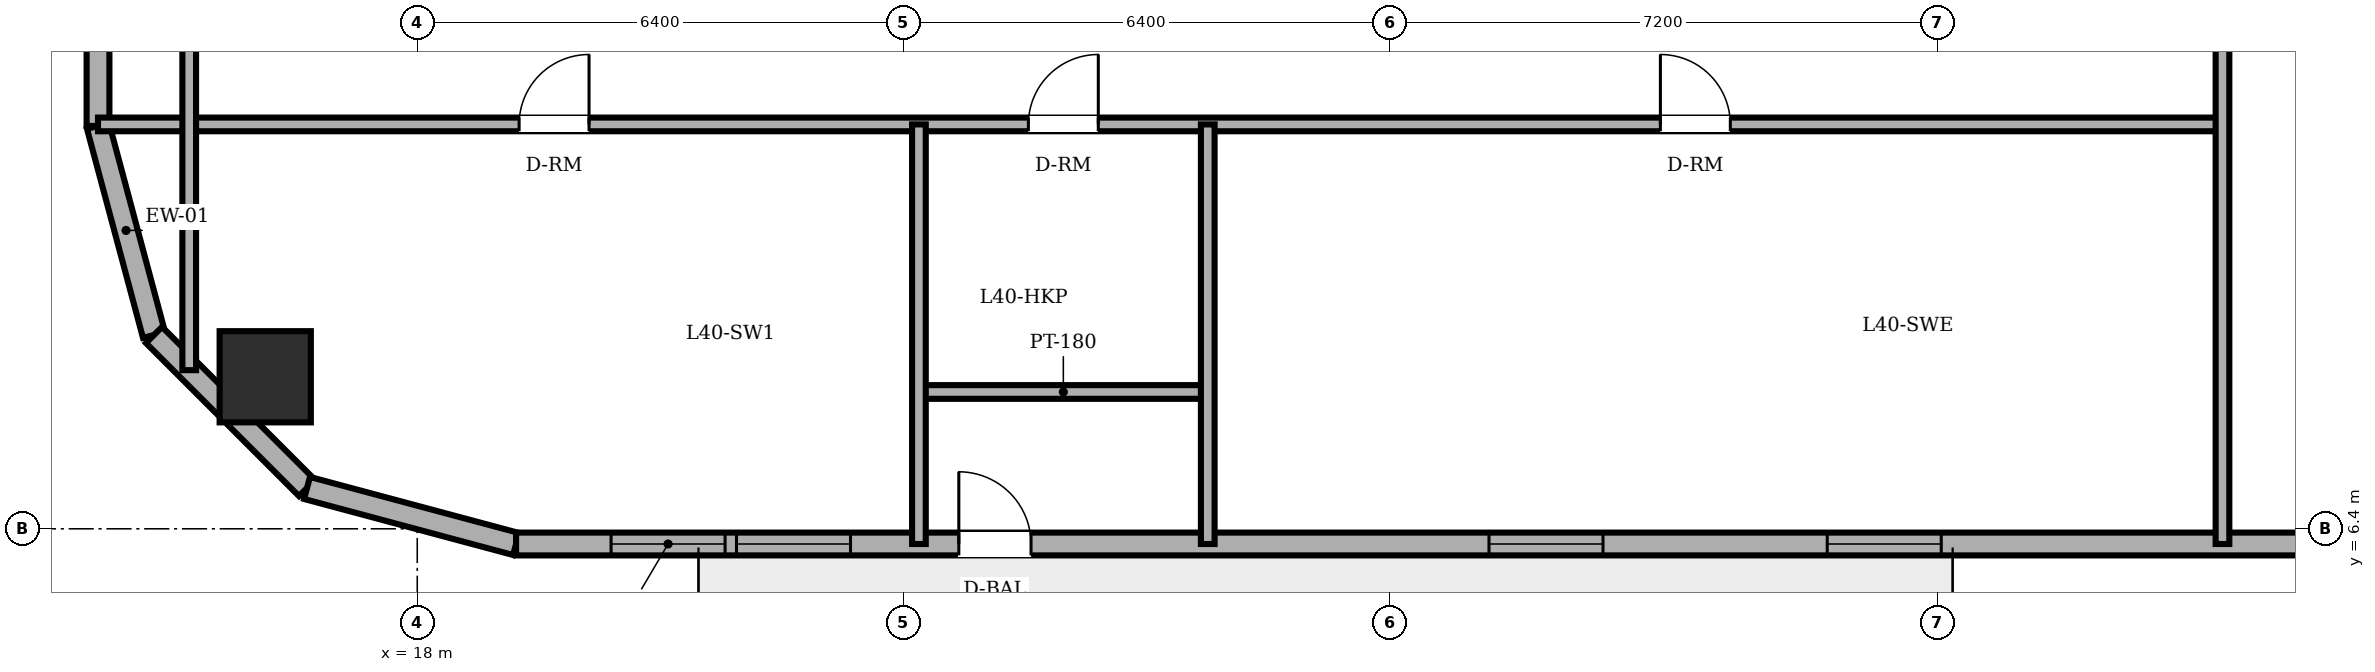
"""IFC4 building model, lengths in metres.
Left out: names, types, materials, properties, quantities, classifications, styles, units other than length and angle.
Written with IfcOpenShell. Run it as: python <this file> out.ifc"""

import sys

from ifc_helpers import new_model, si_unit, direction, frame, frame_2d, origin, origin_2d, place, context, subcontext, project, spatial, rectangle, circle, extrude, element, fill, save


model = new_model("IFC4")
c1 = context("Model", 3, precision=1e-05, world=origin(), true_north=direction((0.0, 1.0)))
c2 = subcontext(c1, "Body", "Model", "MODEL_VIEW")
j1 = project(units=[si_unit("LENGTHUNIT", "METRE"), si_unit("PLANEANGLEUNIT", "RADIAN")], contexts=[c1])
p1 = place(None, origin())
s1 = spatial("IfcSite", under=j1, at=p1, CompositionType="ELEMENT")
p2 = place(p1, origin())
s2 = spatial("IfcBuilding", under=s1, at=p2, CompositionType="ELEMENT")
p3 = place(p2, frame((0.0, 0.0, 154.6)))
s3 = spatial("IfcBuildingStorey", under=s2, at=p3, CompositionType="ELEMENT", Elevation=154.6)
p4 = place(p3, frame((16.0, 8.4, 0.0), z_axis=(0.0, 0.0, 1.0), x_axis=(1.0, 0.0, 0.0)))
e1 = element("IfcColumn", 1, at=p4, inside=s3, PredefinedType="COLUMN", context=c2, shape_type="SweptSolid", body=[
    extrude(circle(Radius=0.6, at=origin_2d()), origin(), (0.0, 0.0, 1.0), 3.6),
])
p5 = place(p3, frame((13.8, 11.7, 0.0), z_axis=(0.0, 0.0, 1.0), x_axis=(0.258884674387, -0.965908238586, 0.0)))
e2 = element("IfcWall", 2, at=p5, inside=s3, PredefinedType="SOLIDWALL", context=c2, shape_type="SweptSolid", body=[
    extrude(rectangle(XDim=2.847, YDim=0.3, at=frame_2d((1.424, 0.0))), origin(), (0.0, 0.0, 1.0), 3.4),
])
p6 = place(p3, frame((14.537, 8.95, 0.0), z_axis=(0.0, 0.0, 1.0), x_axis=(0.707106781187, -0.707106781187, 0.0)))
e3 = element("IfcWall", 3, at=p6, inside=s3, PredefinedType="SOLIDWALL", context=c2, shape_type="SweptSolid", body=[
    extrude(rectangle(XDim=2.847, YDim=0.3, at=frame_2d((1.423, 0.0))), origin(), (0.0, 0.0, 1.0), 3.4),
])
p7 = place(p3, frame((16.55, 6.937, 0.0), z_axis=(0.0, 0.0, 1.0), x_axis=(0.965908238586, -0.258884674387, 0.0)))
e4 = element("IfcWall", 4, at=p7, inside=s3, PredefinedType="SOLIDWALL", context=c2, shape_type="SweptSolid", body=[
    extrude(rectangle(XDim=2.847, YDim=0.3, at=frame_2d((1.424, 0.0))), origin(), (0.0, 0.0, 1.0), 3.4),
])
p8 = place(p3, frame((19.3, 6.2, 0.0), z_axis=(0.0, 0.0, 1.0), x_axis=(1.0, 0.0, 0.0)))
e5 = element("IfcWall", 5, at=p8, inside=s3, PredefinedType="SOLIDWALL", context=c2, shape_type="SweptSolid", body=[
    extrude(rectangle(XDim=30.282, YDim=0.3, at=frame_2d((15.141, 0.0))), origin(), (0.0, 0.0, 1.0), 3.4),
])
p9 = place(p8, frame((5.825, 0.0, 0.0)))
e6 = element("IfcOpeningElement", 6, at=p9, cuts=e5, PredefinedType="OPENING", context=c2, shape_type="SweptSolid", body=[
    extrude(rectangle(XDim=0.95, YDim=2.2, at=frame_2d((0.475, 1.1))), frame((0.0, 0.16, 0.0), z_axis=(0.0, -1.0, 0.0), x_axis=(1.0, 0.0, 0.0)), (0.0, 0.0, 1.0), 0.32),
])
p10 = place(p8, frame((1.25, 0.0, 0.85)))
e7 = element("IfcOpeningElement", 7, at=p10, cuts=e5, PredefinedType="OPENING", context=c2, shape_type="SweptSolid", body=[
    extrude(rectangle(XDim=1.5, YDim=1.55, at=frame_2d((0.75, 0.775))), frame((0.0, 0.16, 0.0), z_axis=(0.0, -1.0, 0.0), x_axis=(1.0, 0.0, 0.0)), (0.0, 0.0, 1.0), 0.32),
])
p11 = place(p8, frame((2.9, 0.0, 0.85)))
e8 = element("IfcOpeningElement", 8, at=p11, cuts=e5, PredefinedType="OPENING", context=c2, shape_type="SweptSolid", body=[
    extrude(rectangle(XDim=1.5, YDim=1.55, at=frame_2d((0.75, 0.775))), frame((0.0, 0.16, 0.0), z_axis=(0.0, -1.0, 0.0), x_axis=(1.0, 0.0, 0.0)), (0.0, 0.0, 1.0), 0.32),
])
p12 = place(p8, frame((12.8, 0.0, 0.85)))
e9 = element("IfcOpeningElement", 9, at=p12, cuts=e5, PredefinedType="OPENING", context=c2, shape_type="SweptSolid", body=[
    extrude(rectangle(XDim=1.5, YDim=1.55, at=frame_2d((0.75, 0.775))), frame((0.0, 0.16, 0.0), z_axis=(0.0, -1.0, 0.0), x_axis=(1.0, 0.0, 0.0)), (0.0, 0.0, 1.0), 0.32),
])
p13 = place(p8, frame((17.25, 0.0, 0.85)))
e10 = element("IfcOpeningElement", 10, at=p13, cuts=e5, PredefinedType="OPENING", context=c2, shape_type="SweptSolid", body=[
    extrude(rectangle(XDim=1.5, YDim=1.55, at=frame_2d((0.75, 0.775))), frame((0.0, 0.16, 0.0), z_axis=(0.0, -1.0, 0.0), x_axis=(1.0, 0.0, 0.0)), (0.0, 0.0, 1.0), 0.32),
])
p14 = place(p8, frame((24.194, 0.0, 0.85)))
e11 = element("IfcOpeningElement", 11, at=p14, cuts=e5, PredefinedType="OPENING", context=c2, shape_type="SweptSolid", body=[
    extrude(rectangle(XDim=1.5, YDim=1.55, at=frame_2d((0.75, 0.775))), frame((0.0, 0.16, 0.0), z_axis=(0.0, -1.0, 0.0), x_axis=(1.0, 0.0, 0.0)), (0.0, 0.0, 1.0), 0.32),
])
p15 = place(p8, frame((26.688, 0.0, 0.85)))
e12 = element("IfcOpeningElement", 12, at=p15, cuts=e5, PredefinedType="OPENING", context=c2, shape_type="SweptSolid", body=[
    extrude(rectangle(XDim=1.5, YDim=1.55, at=frame_2d((0.75, 0.775))), frame((0.0, 0.16, 0.0), z_axis=(0.0, -1.0, 0.0), x_axis=(1.0, 0.0, 0.0)), (0.0, 0.0, 1.0), 0.32),
])
p16 = place(p3, frame((13.8, 36.3, 0.0), z_axis=(0.0, 0.0, 1.0), x_axis=(0.0, -1.0, 0.0)))
e13 = element("IfcWall", 13, at=p16, inside=s3, PredefinedType="SOLIDWALL", context=c2, shape_type="SweptSolid", body=[
    extrude(rectangle(XDim=24.6, YDim=0.3, at=frame_2d((12.3, 0.0))), origin(), (0.0, 0.0, 1.0), 3.4),
])
p17 = place(p16, frame((8.277, 0.0, 0.85)))
e14 = element("IfcOpeningElement", 14, at=p17, cuts=e13, PredefinedType="OPENING", context=c2, shape_type="SweptSolid", body=[
    extrude(rectangle(XDim=1.5, YDim=1.55, at=frame_2d((0.75, 0.775))), frame((0.0, 0.16, 0.0), z_axis=(0.0, -1.0, 0.0), x_axis=(1.0, 0.0, 0.0)), (0.0, 0.0, 1.0), 0.32),
])
p18 = place(p16, frame((14.823, 0.0, 0.85)))
e15 = element("IfcOpeningElement", 15, at=p18, cuts=e13, PredefinedType="OPENING", context=c2, shape_type="SweptSolid", body=[
    extrude(rectangle(XDim=1.5, YDim=1.55, at=frame_2d((0.75, 0.775))), frame((0.0, 0.16, 0.0), z_axis=(0.0, -1.0, 0.0), x_axis=(1.0, 0.0, 0.0)), (0.0, 0.0, 1.0), 0.32),
])
p19 = place(p3, frame((24.6, 8.2, 0.0), z_axis=(0.0, 0.0, 1.0), x_axis=(1.0, 0.0, 0.0)))
e16 = element("IfcWall", 16, at=p19, inside=s3, PredefinedType="PARTITIONING", context=c2, shape_type="SweptSolid", body=[
    extrude(rectangle(XDim=3.8, YDim=0.18, at=frame_2d((1.9, 0.0))), origin(), (0.0, 0.0, 1.0), 2.882),
])
p20 = place(p3, frame((13.8, 11.72, 0.0), z_axis=(0.0, 0.0, 1.0), x_axis=(1.0, 0.0, 0.0)))
e17 = element("IfcWall", 17, at=p20, inside=s3, PredefinedType="PARTITIONING", context=c2, shape_type="SweptSolid", body=[
    extrude(rectangle(XDim=27.95, YDim=0.18, at=frame_2d((13.975, 0.0))), origin(), (0.0, 0.0, 1.0), 3.4),
])
p21 = place(p20, frame((12.24, 0.0, 0.0)))
e18 = element("IfcOpeningElement", 18, at=p21, cuts=e17, PredefinedType="OPENING", context=c2, shape_type="SweptSolid", body=[
    extrude(rectangle(XDim=0.92, YDim=2.1, at=frame_2d((0.46, 1.05))), frame((0.0, 0.1, 0.0), z_axis=(0.0, -1.0, 0.0), x_axis=(1.0, 0.0, 0.0)), (0.0, 0.0, 1.0), 0.2),
])
p22 = place(p20, frame((5.54, 0.0, 0.0)))
e19 = element("IfcOpeningElement", 19, at=p22, cuts=e17, PredefinedType="OPENING", context=c2, shape_type="SweptSolid", body=[
    extrude(rectangle(XDim=0.92, YDim=2.1, at=frame_2d((0.46, 1.05))), frame((0.0, 0.1, 0.0), z_axis=(0.0, -1.0, 0.0), x_axis=(1.0, 0.0, 0.0)), (0.0, 0.0, 1.0), 0.2),
])
p23 = place(p20, frame((20.555, 0.0, 0.0)))
e20 = element("IfcOpeningElement", 20, at=p23, cuts=e17, PredefinedType="OPENING", context=c2, shape_type="SweptSolid", body=[
    extrude(rectangle(XDim=0.92, YDim=2.1, at=frame_2d((0.46, 1.05))), frame((0.0, 0.1, 0.0), z_axis=(0.0, -1.0, 0.0), x_axis=(1.0, 0.0, 0.0)), (0.0, 0.0, 1.0), 0.2),
])
p24 = place(p3, frame((15.0, 8.487, 0.0), z_axis=(0.0, 0.0, 1.0), x_axis=(0.0, 1.0, 0.0)))
e21 = element("IfcWall", 21, at=p24, inside=s3, PredefinedType="PARTITIONING", context=c2, shape_type="SweptSolid", body=[
    extrude(rectangle(XDim=5.693, YDim=0.18, at=frame_2d((2.846, 0.0))), origin(), (0.0, 0.0, 1.0), 3.4),
])
for number, where, z_axis, x_axis in (
    (22, (24.6, 6.2, 0.0), (0.0, 0.0, 1.0), (0.0, 1.0, 0.0)),
    (23, (28.4, 6.2, 0.0), (0.0, 0.0, 1.0), (0.0, 1.0, 0.0)),
):
    element("IfcWall", number, at=place(p3, frame(where, z_axis=z_axis, x_axis=x_axis)), inside=s3, PredefinedType="PARTITIONING", context=c2, shape_type="SweptSolid", body=[
        extrude(rectangle(XDim=5.52, YDim=0.18, at=frame_2d((2.76, 0.0))), origin(), (0.0, 0.0, 1.0), 3.4),
    ])
p25 = place(p3, frame((41.75, 6.2, 0.0), z_axis=(0.0, 0.0, 1.0), x_axis=(0.0, 1.0, 0.0)))
e24 = element("IfcWall", 24, at=p25, inside=s3, PredefinedType="PARTITIONING", context=c2, shape_type="SweptSolid", body=[
    extrude(rectangle(XDim=16.62, YDim=0.18, at=frame_2d((8.31, 0.0))), origin(), (0.0, 0.0, 1.0), 3.4),
])
p26 = place(p25, frame((10.35, 0.0, 0.0)))
e25 = element("IfcOpeningElement", 25, at=p26, cuts=e24, PredefinedType="OPENING", context=c2, shape_type="SweptSolid", body=[
    extrude(rectangle(XDim=0.92, YDim=2.1, at=frame_2d((0.46, 1.05))), frame((0.0, 0.1, 0.0), z_axis=(0.0, -1.0, 0.0), x_axis=(1.0, 0.0, 0.0)), (0.0, 0.0, 1.0), 0.2),
])
p27 = place(p9, origin())
e26 = element("IfcDoor", 26, at=p27, inside=s3, OperationType="SINGLE_SWING_LEFT", PredefinedType="DOOR", context=c2, shape_type="SweptSolid", body=[
    extrude(rectangle(XDim=0.95, YDim=2.2, at=frame_2d((0.475, 1.1))), frame((0.0, 0.025, 0.0), z_axis=(0.0, -1.0, 0.0), x_axis=(1.0, 0.0, 0.0)), (0.0, 0.0, 1.0), 0.05),
])
fill(e6, e26)
p28 = place(p10, origin())
e27 = element("IfcWindow", 27, at=p28, inside=s3, PartitioningType="DOUBLE_PANEL_VERTICAL", PredefinedType="WINDOW", context=c2, shape_type="SweptSolid", body=[
    extrude(rectangle(XDim=1.5, YDim=1.55, at=frame_2d((0.75, 0.775))), frame((0.0, 0.03, 0.0), z_axis=(0.0, -1.0, 0.0), x_axis=(1.0, 0.0, 0.0)), (0.0, 0.0, 1.0), 0.06),
])
fill(e7, e27)
p29 = place(p11, origin())
e28 = element("IfcWindow", 28, at=p29, inside=s3, PartitioningType="DOUBLE_PANEL_VERTICAL", PredefinedType="WINDOW", context=c2, shape_type="SweptSolid", body=[
    extrude(rectangle(XDim=1.5, YDim=1.55, at=frame_2d((0.75, 0.775))), frame((0.0, 0.03, 0.0), z_axis=(0.0, -1.0, 0.0), x_axis=(1.0, 0.0, 0.0)), (0.0, 0.0, 1.0), 0.06),
])
fill(e8, e28)
p30 = place(p12, origin())
e29 = element("IfcWindow", 29, at=p30, inside=s3, PartitioningType="DOUBLE_PANEL_VERTICAL", PredefinedType="WINDOW", context=c2, shape_type="SweptSolid", body=[
    extrude(rectangle(XDim=1.5, YDim=1.55, at=frame_2d((0.75, 0.775))), frame((0.0, 0.03, 0.0), z_axis=(0.0, -1.0, 0.0), x_axis=(1.0, 0.0, 0.0)), (0.0, 0.0, 1.0), 0.06),
])
fill(e9, e29)
p31 = place(p13, origin())
e30 = element("IfcWindow", 30, at=p31, inside=s3, PartitioningType="DOUBLE_PANEL_VERTICAL", PredefinedType="WINDOW", context=c2, shape_type="SweptSolid", body=[
    extrude(rectangle(XDim=1.5, YDim=1.55, at=frame_2d((0.75, 0.775))), frame((0.0, 0.03, 0.0), z_axis=(0.0, -1.0, 0.0), x_axis=(1.0, 0.0, 0.0)), (0.0, 0.0, 1.0), 0.06),
])
fill(e10, e30)
p32 = place(p21, origin())
e31 = element("IfcDoor", 31, at=p32, inside=s3, OperationType="SINGLE_SWING_RIGHT", PredefinedType="DOOR", context=c2, shape_type="SweptSolid", body=[
    extrude(rectangle(XDim=0.92, YDim=2.1, at=frame_2d((0.46, 1.05))), frame((0.0, 0.025, 0.0), z_axis=(0.0, -1.0, 0.0), x_axis=(1.0, 0.0, 0.0)), (0.0, 0.0, 1.0), 0.05),
])
fill(e18, e31)
p33 = place(p22, origin())
e32 = element("IfcDoor", 32, at=p33, inside=s3, OperationType="SINGLE_SWING_RIGHT", PredefinedType="DOOR", context=c2, shape_type="SweptSolid", body=[
    extrude(rectangle(XDim=0.92, YDim=2.1, at=frame_2d((0.46, 1.05))), frame((0.0, 0.025, 0.0), z_axis=(0.0, -1.0, 0.0), x_axis=(1.0, 0.0, 0.0)), (0.0, 0.0, 1.0), 0.05),
])
fill(e19, e32)
p34 = place(p23, origin())
e33 = element("IfcDoor", 33, at=p34, inside=s3, OperationType="SINGLE_SWING_LEFT", PredefinedType="DOOR", context=c2, shape_type="SweptSolid", body=[
    extrude(rectangle(XDim=0.92, YDim=2.1, at=frame_2d((0.46, 1.05))), frame((0.0, 0.025, 0.0), z_axis=(0.0, -1.0, 0.0), x_axis=(1.0, 0.0, 0.0)), (0.0, 0.0, 1.0), 0.05),
])
fill(e20, e33)
save(model, sys.argv[1])
